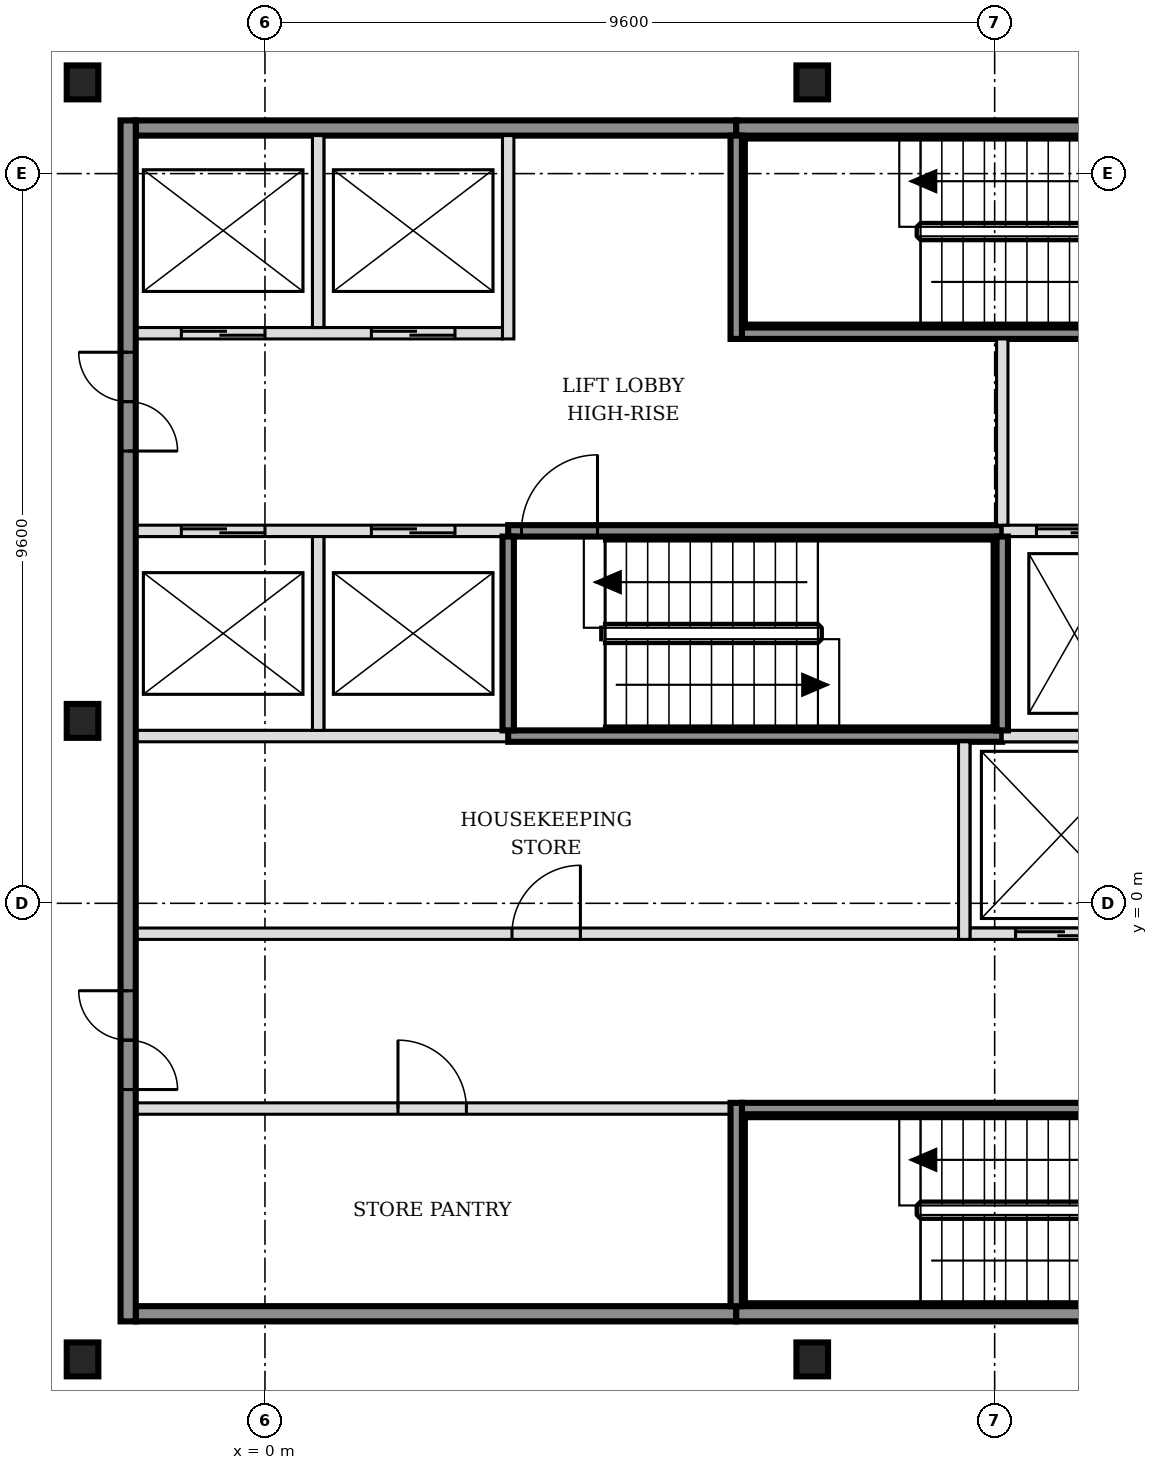
"""IFC4 building model, lengths in metres.
Left out: names, types, materials, properties, quantities, classifications, styles, units other than length and angle.
Written with IfcOpenShell. Run it as: python <this file> out.ifc"""

import sys

from ifc_helpers import new_model, si_unit, direction, frame, frame_2d, origin, origin_2d, place, context, subcontext, project, spatial, rectangle, i_section, extrude, element, fill, save


model = new_model("IFC4")
c1 = context("Model", 3, precision=1e-05, world=origin(), true_north=direction((0.0, 1.0)))
c2 = subcontext(c1, "Body", "Model", "MODEL_VIEW")
j1 = project(units=[si_unit("LENGTHUNIT", "METRE"), si_unit("PLANEANGLEUNIT", "RADIAN")], contexts=[c1])
p1 = place(None, origin())
s1 = spatial("IfcSite", under=j1, at=p1, CompositionType="ELEMENT")
p2 = place(p1, origin())
s2 = spatial("IfcBuilding", under=s1, at=p2, CompositionType="ELEMENT")
p3 = place(p2, frame((0.0, 0.0, 190.2)))
s3 = spatial("IfcBuildingStorey", under=s2, at=p3, CompositionType="ELEMENT", Elevation=190.2)
for number, where, z_axis, x_axis in (
    (1, (-2.4, -6.0, -0.15), (0.0, 0.0, 1.0), (1.0, 0.0, 0.0)),
    (2, (7.2, -6.0, -0.15), (0.0, 0.0, 1.0), (1.0, 0.0, 0.0)),
    (3, (-2.4, 2.4, -0.15), (0.0, 0.0, 1.0), (1.0, 0.0, 0.0)),
    (4, (-2.4, 10.8, -0.15), (0.0, 0.0, 1.0), (1.0, 0.0, 0.0)),
    (5, (7.2, 10.8, -0.15), (0.0, 0.0, 1.0), (1.0, 0.0, 0.0)),
):
    element("IfcColumn", number, at=place(p3, frame(where, z_axis=z_axis, x_axis=x_axis)), inside=s3, PredefinedType="COLUMN", context=c2, shape_type="SweptSolid", body=[
        extrude(i_section(OverallWidth=0.416, OverallDepth=0.446, WebThickness=0.039, FlangeThickness=0.063, FilletRadius=0.015, at=origin_2d()), origin(), (0.0, 0.0, 1.0), 3.6),
    ])
p4 = place(p3, frame((-1.7, -5.4, 0.0), z_axis=(0.0, 0.0, 1.0), x_axis=(1.0, 0.0, 0.0)))
e6 = element("IfcWall", 6, at=p4, inside=s3, PredefinedType="SOLIDWALL", context=c2, shape_type="SweptSolid", body=[
    extrude(rectangle(XDim=7.9, YDim=0.2, at=frame_2d((3.95, 0.0))), origin(), (0.0, 0.0, 1.0), 3.45),
])
p5 = place(p3, frame((6.2, -5.4, 0.0), z_axis=(0.0, 0.0, 1.0), x_axis=(1.0, 0.0, 0.0)))
e7 = element("IfcWall", 7, at=p5, inside=s3, PredefinedType="SOLIDWALL", context=c2, shape_type="SweptSolid", body=[
    extrude(rectangle(XDim=6.5, YDim=0.2, at=frame_2d((3.25, 0.0))), origin(), (0.0, 0.0, 1.0), 3.45),
])
p6 = place(p3, frame((-1.7, -2.7, 0.0), z_axis=(0.0, 0.0, 1.0), x_axis=(1.0, 0.0, 0.0)))
e8 = element("IfcWall", 8, at=p6, inside=s3, PredefinedType="PARTITIONING", context=c2, shape_type="SweptSolid", body=[
    extrude(rectangle(XDim=7.825, YDim=0.15, at=frame_2d((3.913, 0.0))), origin(), (0.0, 0.0, 1.0), 3.45),
])
p7 = place(p6, frame((3.45, 0.0, 0.0)))
e9 = element("IfcOpeningElement", 9, at=p7, cuts=e8, PredefinedType="OPENING", context=c2, shape_type="SweptSolid", body=[
    extrude(rectangle(XDim=0.9, YDim=2.1, at=frame_2d((0.45, 1.05))), frame((0.0, 0.085, 0.0), z_axis=(0.0, -1.0, 0.0), x_axis=(1.0, 0.0, 0.0)), (0.0, 0.0, 1.0), 0.17),
])
p8 = place(p3, frame((6.275, -2.7, 0.0), z_axis=(0.0, 0.0, 1.0), x_axis=(1.0, 0.0, 0.0)))
e10 = element("IfcWall", 10, at=p8, inside=s3, PredefinedType="SOLIDWALL", context=c2, shape_type="SweptSolid", body=[
    extrude(rectangle(XDim=6.35, YDim=0.15, at=frame_2d((3.175, 0.0))), origin(), (0.0, 0.0, 1.0), 3.45),
])
p9 = place(p8, frame((5.225, 0.0, 0.0)))
e11 = element("IfcOpeningElement", 11, at=p9, cuts=e10, PredefinedType="OPENING", context=c2, shape_type="SweptSolid", body=[
    extrude(rectangle(XDim=1.0, YDim=2.1, at=frame_2d((0.5, 1.05))), frame((0.0, 0.085, 0.0), z_axis=(0.0, -1.0, 0.0), x_axis=(1.0, 0.0, 0.0)), (0.0, 0.0, 1.0), 0.17),
])
p10 = place(p3, frame((-1.7, -0.4, 0.0), z_axis=(0.0, 0.0, 1.0), x_axis=(1.0, 0.0, 0.0)))
e12 = element("IfcWall", 12, at=p10, inside=s3, PredefinedType="PARTITIONING", context=c2, shape_type="SweptSolid", body=[
    extrude(rectangle(XDim=10.825, YDim=0.15, at=frame_2d((5.413, 0.0))), origin(), (0.0, 0.0, 1.0), 3.45),
])
p11 = place(p10, frame((4.95, 0.0, 0.0)))
e13 = element("IfcOpeningElement", 13, at=p11, cuts=e12, PredefinedType="OPENING", context=c2, shape_type="SweptSolid", body=[
    extrude(rectangle(XDim=0.9, YDim=2.1, at=frame_2d((0.45, 1.05))), frame((0.0, 0.085, 0.0), z_axis=(0.0, -1.0, 0.0), x_axis=(1.0, 0.0, 0.0)), (0.0, 0.0, 1.0), 0.17),
])
p12 = place(p3, frame((9.275, -0.4, 0.0), z_axis=(0.0, 0.0, 1.0), x_axis=(1.0, 0.0, 0.0)))
e14 = element("IfcWall", 14, at=p12, inside=s3, PredefinedType="SOLIDWALL", context=c2, shape_type="SweptSolid", body=[
    extrude(rectangle(XDim=4.95, YDim=0.15, at=frame_2d((2.475, 0.0))), origin(), (0.0, 0.0, 1.0), 3.45),
])
p13 = place(p12, frame((0.6, 0.0, 0.0)))
e15 = element("IfcOpeningElement", 15, at=p13, cuts=e14, PredefinedType="OPENING", context=c2, shape_type="SweptSolid", body=[
    extrude(rectangle(XDim=1.2, YDim=2.1, at=frame_2d((0.6, 1.05))), frame((0.0, 0.085, 0.0), z_axis=(0.0, -1.0, 0.0), x_axis=(1.0, 0.0, 0.0)), (0.0, 0.0, 1.0), 0.17),
])
p14 = place(p12, frame((3.15, 0.0, 0.0)))
e16 = element("IfcOpeningElement", 16, at=p14, cuts=e14, PredefinedType="OPENING", context=c2, shape_type="SweptSolid", body=[
    extrude(rectangle(XDim=1.2, YDim=2.1, at=frame_2d((0.6, 1.05))), frame((0.0, 0.085, 0.0), z_axis=(0.0, -1.0, 0.0), x_axis=(1.0, 0.0, 0.0)), (0.0, 0.0, 1.0), 0.17),
])
p15 = place(p3, frame((-1.7, 2.2, 0.0), z_axis=(0.0, 0.0, 1.0), x_axis=(1.0, 0.0, 0.0)))
e17 = element("IfcWall", 17, at=p15, inside=s3, PredefinedType="SOLIDWALL", context=c2, shape_type="SweptSolid", body=[
    extrude(rectangle(XDim=4.9, YDim=0.15, at=frame_2d((2.45, 0.0))), origin(), (0.0, 0.0, 1.0), 3.45),
])
p16 = place(p3, frame((3.2, 2.2, 0.0), z_axis=(0.0, 0.0, 1.0), x_axis=(1.0, 0.0, 0.0)))
e18 = element("IfcWall", 18, at=p16, inside=s3, PredefinedType="SOLIDWALL", context=c2, shape_type="SweptSolid", body=[
    extrude(rectangle(XDim=6.5, YDim=0.15, at=frame_2d((3.25, 0.0))), origin(), (0.0, 0.0, 1.0), 3.45),
])
p17 = place(p3, frame((9.7, 2.2, 0.0), z_axis=(0.0, 0.0, 1.0), x_axis=(1.0, 0.0, 0.0)))
e19 = element("IfcWall", 19, at=p17, inside=s3, PredefinedType="SOLIDWALL", context=c2, shape_type="SweptSolid", body=[
    extrude(rectangle(XDim=4.525, YDim=0.15, at=frame_2d((2.263, 0.0))), origin(), (0.0, 0.0, 1.0), 3.45),
])
p18 = place(p3, frame((-1.7, 4.9, 0.0), z_axis=(0.0, 0.0, 1.0), x_axis=(1.0, 0.0, 0.0)))
e20 = element("IfcWall", 20, at=p18, inside=s3, PredefinedType="SOLIDWALL", context=c2, shape_type="SweptSolid", body=[
    extrude(rectangle(XDim=4.9, YDim=0.15, at=frame_2d((2.45, 0.0))), origin(), (0.0, 0.0, 1.0), 3.45),
])
p19 = place(p18, frame((0.6, 0.0, 0.0)))
e21 = element("IfcOpeningElement", 21, at=p19, cuts=e20, PredefinedType="OPENING", context=c2, shape_type="SweptSolid", body=[
    extrude(rectangle(XDim=1.1, YDim=2.1, at=frame_2d((0.55, 1.05))), frame((0.0, 0.085, 0.0), z_axis=(0.0, -1.0, 0.0), x_axis=(1.0, 0.0, 0.0)), (0.0, 0.0, 1.0), 0.17),
])
p20 = place(p18, frame((3.1, 0.0, 0.0)))
e22 = element("IfcOpeningElement", 22, at=p20, cuts=e20, PredefinedType="OPENING", context=c2, shape_type="SweptSolid", body=[
    extrude(rectangle(XDim=1.1, YDim=2.1, at=frame_2d((0.55, 1.05))), frame((0.0, 0.085, 0.0), z_axis=(0.0, -1.0, 0.0), x_axis=(1.0, 0.0, 0.0)), (0.0, 0.0, 1.0), 0.17),
])
p21 = place(p3, frame((3.2, 4.9, 0.0), z_axis=(0.0, 0.0, 1.0), x_axis=(1.0, 0.0, 0.0)))
e23 = element("IfcWall", 23, at=p21, inside=s3, PredefinedType="SOLIDWALL", context=c2, shape_type="SweptSolid", body=[
    extrude(rectangle(XDim=6.5, YDim=0.15, at=frame_2d((3.25, 0.0))), origin(), (0.0, 0.0, 1.0), 3.45),
])
p22 = place(p21, frame((0.175, 0.0, 0.0)))
e24 = element("IfcOpeningElement", 24, at=p22, cuts=e23, PredefinedType="OPENING", context=c2, shape_type="SweptSolid", body=[
    extrude(rectangle(XDim=1.0, YDim=2.1, at=frame_2d((0.5, 1.05))), frame((0.0, 0.085, 0.0), z_axis=(0.0, -1.0, 0.0), x_axis=(1.0, 0.0, 0.0)), (0.0, 0.0, 1.0), 0.17),
])
p23 = place(p3, frame((9.7, 4.9, 0.0), z_axis=(0.0, 0.0, 1.0), x_axis=(1.0, 0.0, 0.0)))
e25 = element("IfcWall", 25, at=p23, inside=s3, PredefinedType="SOLIDWALL", context=c2, shape_type="SweptSolid", body=[
    extrude(rectangle(XDim=6.4, YDim=0.15, at=frame_2d((3.2, 0.0))), origin(), (0.0, 0.0, 1.0), 3.45),
])
p24 = place(p23, frame((0.45, 0.0, 0.0)))
e26 = element("IfcOpeningElement", 26, at=p24, cuts=e25, PredefinedType="OPENING", context=c2, shape_type="SweptSolid", body=[
    extrude(rectangle(XDim=1.0, YDim=2.1, at=frame_2d((0.5, 1.05))), frame((0.0, 0.085, 0.0), z_axis=(0.0, -1.0, 0.0), x_axis=(1.0, 0.0, 0.0)), (0.0, 0.0, 1.0), 0.17),
])
p25 = place(p23, frame((2.35, 0.0, 0.0)))
e27 = element("IfcOpeningElement", 27, at=p25, cuts=e25, PredefinedType="OPENING", context=c2, shape_type="SweptSolid", body=[
    extrude(rectangle(XDim=1.0, YDim=2.1, at=frame_2d((0.5, 1.05))), frame((0.0, 0.085, 0.0), z_axis=(0.0, -1.0, 0.0), x_axis=(1.0, 0.0, 0.0)), (0.0, 0.0, 1.0), 0.17),
])
p26 = place(p23, frame((4.7, 0.0, 0.0)))
e28 = element("IfcOpeningElement", 28, at=p26, cuts=e25, PredefinedType="OPENING", context=c2, shape_type="SweptSolid", body=[
    extrude(rectangle(XDim=0.9, YDim=2.1, at=frame_2d((0.45, 1.05))), frame((0.0, 0.085, 0.0), z_axis=(0.0, -1.0, 0.0), x_axis=(1.0, 0.0, 0.0)), (0.0, 0.0, 1.0), 0.17),
])
p27 = place(p3, frame((-1.7, 7.5, 0.0), z_axis=(0.0, 0.0, 1.0), x_axis=(1.0, 0.0, 0.0)))
e29 = element("IfcWall", 29, at=p27, inside=s3, PredefinedType="SOLIDWALL", context=c2, shape_type="SweptSolid", body=[
    extrude(rectangle(XDim=4.825, YDim=0.15, at=frame_2d((2.413, 0.0))), origin(), (0.0, 0.0, 1.0), 3.45),
])
p28 = place(p27, frame((0.6, 0.0, 0.0)))
e30 = element("IfcOpeningElement", 30, at=p28, cuts=e29, PredefinedType="OPENING", context=c2, shape_type="SweptSolid", body=[
    extrude(rectangle(XDim=1.1, YDim=2.1, at=frame_2d((0.55, 1.05))), frame((0.0, 0.085, 0.0), z_axis=(0.0, -1.0, 0.0), x_axis=(1.0, 0.0, 0.0)), (0.0, 0.0, 1.0), 0.17),
])
p29 = place(p27, frame((3.1, 0.0, 0.0)))
e31 = element("IfcOpeningElement", 31, at=p29, cuts=e29, PredefinedType="OPENING", context=c2, shape_type="SweptSolid", body=[
    extrude(rectangle(XDim=1.1, YDim=2.1, at=frame_2d((0.55, 1.05))), frame((0.0, 0.085, 0.0), z_axis=(0.0, -1.0, 0.0), x_axis=(1.0, 0.0, 0.0)), (0.0, 0.0, 1.0), 0.17),
])
p30 = place(p3, frame((6.275, 7.5, 0.0), z_axis=(0.0, 0.0, 1.0), x_axis=(1.0, 0.0, 0.0)))
e32 = element("IfcWall", 32, at=p30, inside=s3, PredefinedType="SOLIDWALL", context=c2, shape_type="SweptSolid", body=[
    extrude(rectangle(XDim=6.425, YDim=0.15, at=frame_2d((3.212, 0.0))), origin(), (0.0, 0.0, 1.0), 3.45),
])
p31 = place(p30, frame((5.225, 0.0, 0.0)))
e33 = element("IfcOpeningElement", 33, at=p31, cuts=e32, PredefinedType="OPENING", context=c2, shape_type="SweptSolid", body=[
    extrude(rectangle(XDim=1.0, YDim=2.1, at=frame_2d((0.5, 1.05))), frame((0.0, 0.085, 0.0), z_axis=(0.0, -1.0, 0.0), x_axis=(1.0, 0.0, 0.0)), (0.0, 0.0, 1.0), 0.17),
])
p32 = place(p3, frame((-1.7, 10.2, 0.0), z_axis=(0.0, 0.0, 1.0), x_axis=(1.0, 0.0, 0.0)))
e34 = element("IfcWall", 34, at=p32, inside=s3, PredefinedType="SOLIDWALL", context=c2, shape_type="SweptSolid", body=[
    extrude(rectangle(XDim=7.9, YDim=0.2, at=frame_2d((3.95, 0.0))), origin(), (0.0, 0.0, 1.0), 3.45),
])
p33 = place(p3, frame((6.2, 10.2, 0.0), z_axis=(0.0, 0.0, 1.0), x_axis=(1.0, 0.0, 0.0)))
e35 = element("IfcWall", 35, at=p33, inside=s3, PredefinedType="SOLIDWALL", context=c2, shape_type="SweptSolid", body=[
    extrude(rectangle(XDim=6.5, YDim=0.2, at=frame_2d((3.25, 0.0))), origin(), (0.0, 0.0, 1.0), 3.45),
])
p34 = place(p3, frame((-1.8, -5.5, 0.0), z_axis=(0.0, 0.0, 1.0), x_axis=(0.0, 1.0, 0.0)))
e36 = element("IfcWall", 36, at=p34, inside=s3, PredefinedType="SOLIDWALL", context=c2, shape_type="SweptSolid", body=[
    extrude(rectangle(XDim=15.8, YDim=0.2, at=frame_2d((7.9, 0.0))), origin(), (0.0, 0.0, 1.0), 3.45),
])
p35 = place(p34, frame((3.05, 0.0, 0.0)))
e37 = element("IfcOpeningElement", 37, at=p35, cuts=e36, PredefinedType="OPENING", context=c2, shape_type="SweptSolid", body=[
    extrude(rectangle(XDim=1.3, YDim=2.1, at=frame_2d((0.65, 1.05))), frame((0.0, 0.11, 0.0), z_axis=(0.0, -1.0, 0.0), x_axis=(1.0, 0.0, 0.0)), (0.0, 0.0, 1.0), 0.22),
])
p36 = place(p34, frame((11.45, 0.0, 0.0)))
e38 = element("IfcOpeningElement", 38, at=p36, cuts=e36, PredefinedType="OPENING", context=c2, shape_type="SweptSolid", body=[
    extrude(rectangle(XDim=1.3, YDim=2.1, at=frame_2d((0.65, 1.05))), frame((0.0, 0.11, 0.0), z_axis=(0.0, -1.0, 0.0), x_axis=(1.0, 0.0, 0.0)), (0.0, 0.0, 1.0), 0.22),
])
p37 = place(p3, frame((0.7, 2.275, 0.0), z_axis=(0.0, 0.0, 1.0), x_axis=(0.0, 1.0, 0.0)))
e39 = element("IfcWall", 39, at=p37, inside=s3, PredefinedType="SOLIDWALL", context=c2, shape_type="SweptSolid", body=[
    extrude(rectangle(XDim=2.55, YDim=0.15, at=frame_2d((1.275, 0.0))), origin(), (0.0, 0.0, 1.0), 3.45),
])
p38 = place(p3, frame((0.7, 7.575, 0.0), z_axis=(0.0, 0.0, 1.0), x_axis=(0.0, 1.0, 0.0)))
e40 = element("IfcWall", 40, at=p38, inside=s3, PredefinedType="SOLIDWALL", context=c2, shape_type="SweptSolid", body=[
    extrude(rectangle(XDim=2.525, YDim=0.15, at=frame_2d((1.263, 0.0))), origin(), (0.0, 0.0, 1.0), 3.45),
])
p39 = place(p3, frame((3.2, 2.275, 0.0), z_axis=(0.0, 0.0, 1.0), x_axis=(0.0, 1.0, 0.0)))
e41 = element("IfcWall", 41, at=p39, inside=s3, PredefinedType="SOLIDWALL", context=c2, shape_type="SweptSolid", body=[
    extrude(rectangle(XDim=2.55, YDim=0.15, at=frame_2d((1.275, 0.0))), origin(), (0.0, 0.0, 1.0), 3.45),
])
for number, where, z_axis, x_axis in (
    (42, (3.2, 7.425, 0.0), (0.0, 0.0, 1.0), (0.0, 1.0, 0.0)),
    (43, (6.2, -5.3, 0.0), (0.0, 0.0, 1.0), (0.0, 1.0, 0.0)),
    (44, (6.2, 7.425, 0.0), (0.0, 0.0, 1.0), (0.0, 1.0, 0.0)),
):
    element("IfcWall", number, at=place(p3, frame(where, z_axis=z_axis, x_axis=x_axis)), inside=s3, PredefinedType="SOLIDWALL", context=c2, shape_type="SweptSolid", body=[
        extrude(rectangle(XDim=2.675, YDim=0.15, at=frame_2d((1.337, 0.0))), origin(), (0.0, 0.0, 1.0), 3.45),
    ])
p40 = place(p3, frame((9.2, -0.475, 0.0), z_axis=(0.0, 0.0, 1.0), x_axis=(0.0, 1.0, 0.0)))
e45 = element("IfcWall", 45, at=p40, inside=s3, PredefinedType="SOLIDWALL", context=c2, shape_type="SweptSolid", body=[
    extrude(rectangle(XDim=2.6, YDim=0.15, at=frame_2d((1.3, 0.0))), origin(), (0.0, 0.0, 1.0), 3.45),
])
p41 = place(p3, frame((9.7, 2.275, 0.0), z_axis=(0.0, 0.0, 1.0), x_axis=(0.0, 1.0, 0.0)))
e46 = element("IfcWall", 46, at=p41, inside=s3, PredefinedType="SOLIDWALL", context=c2, shape_type="SweptSolid", body=[
    extrude(rectangle(XDim=2.55, YDim=0.15, at=frame_2d((1.275, 0.0))), origin(), (0.0, 0.0, 1.0), 3.45),
])
p42 = place(p3, frame((9.7, 4.975, 0.0), z_axis=(0.0, 0.0, 1.0), x_axis=(0.0, 1.0, 0.0)))
e47 = element("IfcWall", 47, at=p42, inside=s3, PredefinedType="SOLIDWALL", context=c2, shape_type="SweptSolid", body=[
    extrude(rectangle(XDim=2.45, YDim=0.15, at=frame_2d((1.225, 0.0))), origin(), (0.0, 0.0, 1.0), 3.45),
])
p43 = place(p13, origin())
e48 = element("IfcDoor", 48, at=p43, inside=s3, OperationType="DOUBLE_DOOR_SLIDING", PredefinedType="DOOR", context=c2, shape_type="SweptSolid", body=[
    extrude(rectangle(XDim=1.2, YDim=2.1, at=frame_2d((0.6, 1.05))), frame((0.0, 0.025, 0.0), z_axis=(0.0, -1.0, 0.0), x_axis=(1.0, 0.0, 0.0)), (0.0, 0.0, 1.0), 0.05),
])
fill(e15, e48)
p44 = place(p19, origin())
e49 = element("IfcDoor", 49, at=p44, inside=s3, OperationType="DOUBLE_DOOR_SLIDING", PredefinedType="DOOR", context=c2, shape_type="SweptSolid", body=[
    extrude(rectangle(XDim=1.1, YDim=2.1, at=frame_2d((0.55, 1.05))), frame((0.0, 0.025, 0.0), z_axis=(0.0, -1.0, 0.0), x_axis=(1.0, 0.0, 0.0)), (0.0, 0.0, 1.0), 0.05),
])
fill(e21, e49)
p45 = place(p20, origin())
e50 = element("IfcDoor", 50, at=p45, inside=s3, OperationType="DOUBLE_DOOR_SLIDING", PredefinedType="DOOR", context=c2, shape_type="SweptSolid", body=[
    extrude(rectangle(XDim=1.1, YDim=2.1, at=frame_2d((0.55, 1.05))), frame((0.0, 0.025, 0.0), z_axis=(0.0, -1.0, 0.0), x_axis=(1.0, 0.0, 0.0)), (0.0, 0.0, 1.0), 0.05),
])
fill(e22, e50)
p46 = place(p28, origin())
e51 = element("IfcDoor", 51, at=p46, inside=s3, OperationType="DOUBLE_DOOR_SLIDING", PredefinedType="DOOR", context=c2, shape_type="SweptSolid", body=[
    extrude(rectangle(XDim=1.1, YDim=2.1, at=frame_2d((0.55, 1.05))), frame((0.0, 0.025, 0.0), z_axis=(0.0, -1.0, 0.0), x_axis=(1.0, 0.0, 0.0)), (0.0, 0.0, 1.0), 0.05),
])
fill(e30, e51)
p47 = place(p29, origin())
e52 = element("IfcDoor", 52, at=p47, inside=s3, OperationType="DOUBLE_DOOR_SLIDING", PredefinedType="DOOR", context=c2, shape_type="SweptSolid", body=[
    extrude(rectangle(XDim=1.1, YDim=2.1, at=frame_2d((0.55, 1.05))), frame((0.0, 0.025, 0.0), z_axis=(0.0, -1.0, 0.0), x_axis=(1.0, 0.0, 0.0)), (0.0, 0.0, 1.0), 0.05),
])
fill(e31, e52)
p48 = place(p24, origin())
e53 = element("IfcDoor", 53, at=p48, inside=s3, OperationType="DOUBLE_DOOR_SLIDING", PredefinedType="DOOR", context=c2, shape_type="SweptSolid", body=[
    extrude(rectangle(XDim=1.0, YDim=2.1, at=frame_2d((0.5, 1.05))), frame((0.0, 0.025, 0.0), z_axis=(0.0, -1.0, 0.0), x_axis=(1.0, 0.0, 0.0)), (0.0, 0.0, 1.0), 0.05),
])
fill(e26, e53)
p49 = place(p22, origin())
e54 = element("IfcDoor", 54, at=p49, inside=s3, OperationType="SINGLE_SWING_RIGHT", PredefinedType="DOOR", context=c2, shape_type="SweptSolid", body=[
    extrude(rectangle(XDim=1.0, YDim=2.1, at=frame_2d((0.5, 1.05))), frame((0.0, 0.025, 0.0), z_axis=(0.0, -1.0, 0.0), x_axis=(1.0, 0.0, 0.0)), (0.0, 0.0, 1.0), 0.05),
])
fill(e24, e54)
p50 = place(p35, origin())
e55 = element("IfcDoor", 55, at=p50, inside=s3, OperationType="DOUBLE_DOOR_SINGLE_SWING", PredefinedType="DOOR", context=c2, shape_type="SweptSolid", body=[
    extrude(rectangle(XDim=1.3, YDim=2.1, at=frame_2d((0.65, 1.05))), frame((0.0, 0.025, 0.0), z_axis=(0.0, -1.0, 0.0), x_axis=(1.0, 0.0, 0.0)), (0.0, 0.0, 1.0), 0.05),
])
fill(e37, e55)
p51 = place(p36, origin())
e56 = element("IfcDoor", 56, at=p51, inside=s3, OperationType="DOUBLE_DOOR_SINGLE_SWING", PredefinedType="DOOR", context=c2, shape_type="SweptSolid", body=[
    extrude(rectangle(XDim=1.3, YDim=2.1, at=frame_2d((0.65, 1.05))), frame((0.0, 0.025, 0.0), z_axis=(0.0, -1.0, 0.0), x_axis=(1.0, 0.0, 0.0)), (0.0, 0.0, 1.0), 0.05),
])
fill(e38, e56)
p52 = place(p7, origin())
e57 = element("IfcDoor", 57, at=p52, inside=s3, OperationType="SINGLE_SWING_LEFT", PredefinedType="DOOR", context=c2, shape_type="SweptSolid", body=[
    extrude(rectangle(XDim=0.9, YDim=2.1, at=frame_2d((0.45, 1.05))), frame((0.0, 0.025, 0.0), z_axis=(0.0, -1.0, 0.0), x_axis=(1.0, 0.0, 0.0)), (0.0, 0.0, 1.0), 0.05),
])
fill(e9, e57)
p53 = place(p11, origin())
e58 = element("IfcDoor", 58, at=p53, inside=s3, OperationType="SINGLE_SWING_RIGHT", PredefinedType="DOOR", context=c2, shape_type="SweptSolid", body=[
    extrude(rectangle(XDim=0.9, YDim=2.1, at=frame_2d((0.45, 1.05))), frame((0.0, 0.025, 0.0), z_axis=(0.0, -1.0, 0.0), x_axis=(1.0, 0.0, 0.0)), (0.0, 0.0, 1.0), 0.05),
])
fill(e13, e58)
save(model, sys.argv[1])
